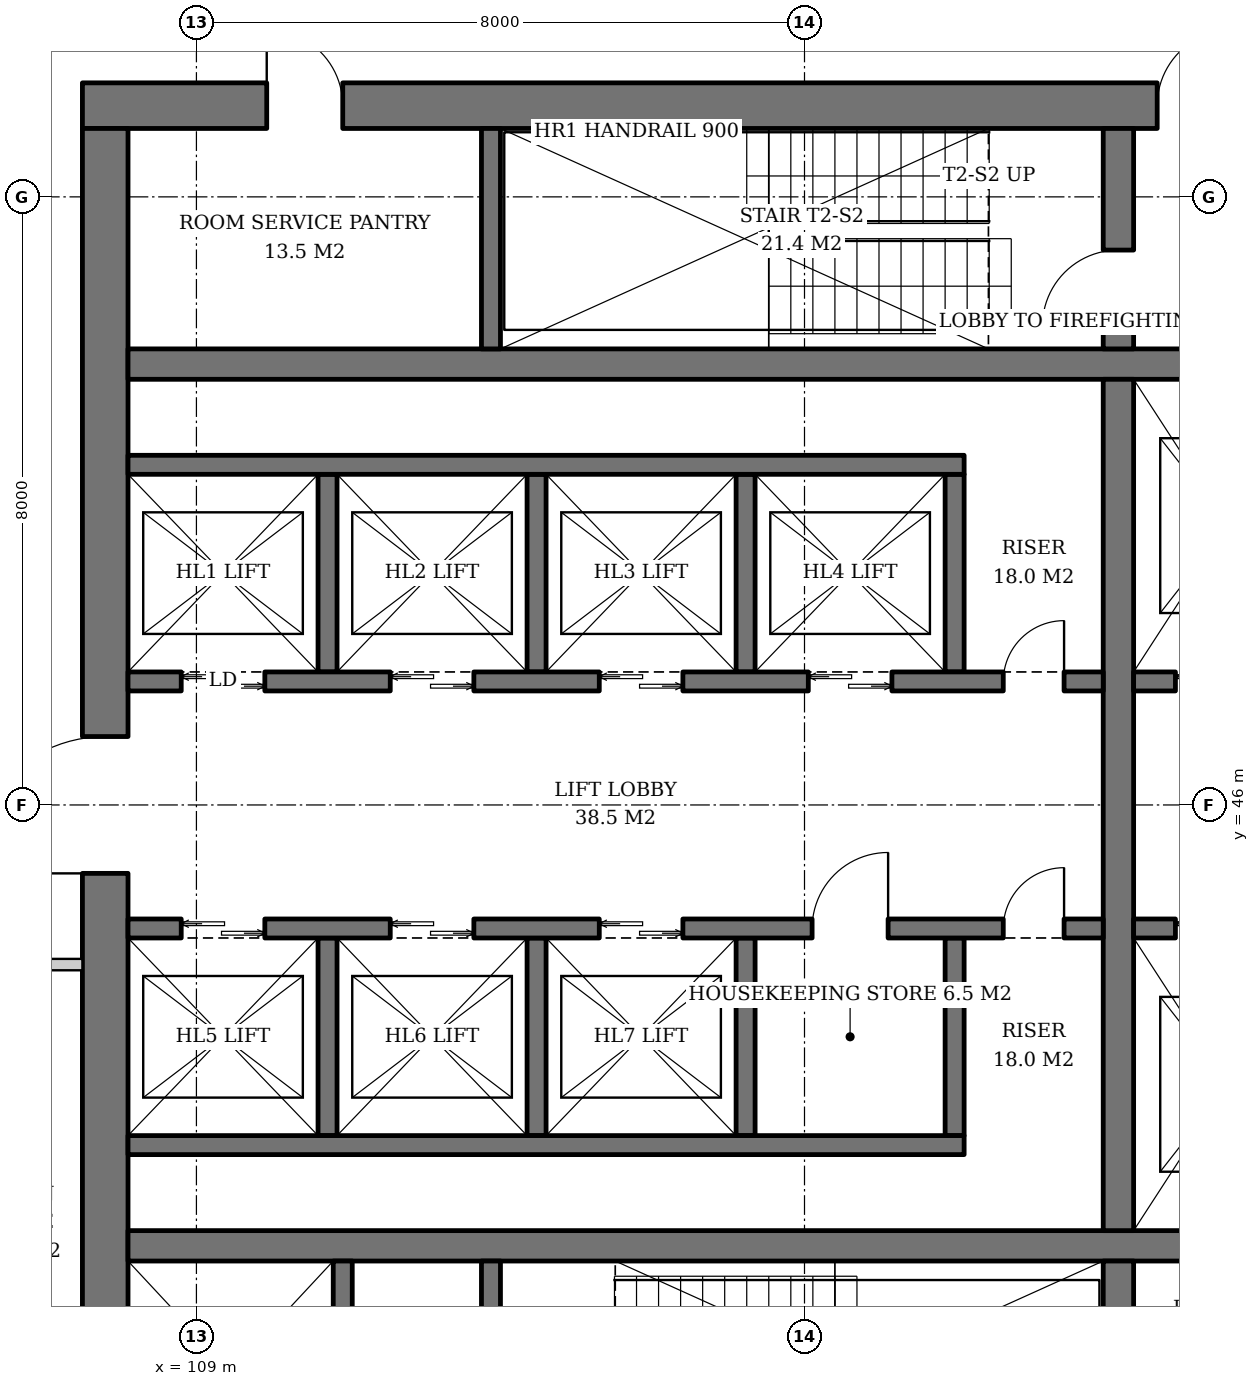
"""IFC4 building model, lengths in metres.
Left out: names, types, materials, properties, quantities, classifications, styles, units other than length and angle.
Written with IfcOpenShell. Run it as: python <this file> out.ifc"""

import sys

from ifc_helpers import new_model, si_unit, direction, frame, frame_2d, origin, place, context, subcontext, project, spatial, rectangle, extrude, element, fill, save


model = new_model("IFC4")
c1 = context("Model", 3, precision=1e-05, world=origin(), true_north=direction((0.0, 1.0)))
c2 = subcontext(c1, "Body", "Model", "MODEL_VIEW")
j1 = project(units=[si_unit("LENGTHUNIT", "METRE"), si_unit("PLANEANGLEUNIT", "RADIAN")], contexts=[c1])
p1 = place(None, origin())
s1 = spatial("IfcSite", under=j1, at=p1, CompositionType="ELEMENT")
p2 = place(p1, origin())
s2 = spatial("IfcBuilding", under=s1, at=p2, CompositionType="ELEMENT")
p3 = place(p2, frame((0.0, 0.0, 28.6)))
s3 = spatial("IfcBuildingStorey", under=s2, at=p3, CompositionType="ELEMENT", Elevation=28.6)
p4 = place(p3, frame((107.5, 55.2, 0.0), z_axis=(0.0, 0.0, 1.0), x_axis=(1.0, 0.0, 0.0)))
e1 = element("IfcWall", 1, at=p4, inside=s3, PredefinedType="SHEAR", context=c2, shape_type="SweptSolid", body=[
    extrude(rectangle(XDim=19.0, YDim=0.6, at=frame_2d((9.5, 0.0))), origin(), (0.0, 0.0, 1.0), 3.8),
])
p5 = place(p4, frame((14.14, 0.0, 0.0)))
e2 = element("IfcOpeningElement", 2, at=p5, cuts=e1, PredefinedType="OPENING", context=c2, shape_type="SweptSolid", body=[
    extrude(rectangle(XDim=1.0, YDim=2.1, at=frame_2d((0.5, 1.05))), frame((0.0, 0.31, 0.0), z_axis=(0.0, -1.0, 0.0), x_axis=(1.0, 0.0, 0.0)), (0.0, 0.0, 1.0), 0.62),
])
p6 = place(p4, frame((2.425, 0.0, 0.0)))
e3 = element("IfcOpeningElement", 3, at=p6, cuts=e1, PredefinedType="OPENING", context=c2, shape_type="SweptSolid", body=[
    extrude(rectangle(XDim=1.0, YDim=2.1, at=frame_2d((0.5, 1.05))), frame((0.0, 0.31, 0.0), z_axis=(0.0, -1.0, 0.0), x_axis=(1.0, 0.0, 0.0)), (0.0, 0.0, 1.0), 0.62),
])
p7 = place(p3, frame((107.8, 37.1, 0.0), z_axis=(0.0, 0.0, 1.0), x_axis=(0.0, 1.0, 0.0)))
e4 = element("IfcWall", 4, at=p7, inside=s3, PredefinedType="SHEAR", context=c2, shape_type="SweptSolid", body=[
    extrude(rectangle(XDim=17.8, YDim=0.6, at=frame_2d((8.9, 0.0))), origin(), (0.0, 0.0, 1.0), 3.8),
])
p8 = place(p7, frame((8.0, 0.0, 0.0)))
e5 = element("IfcOpeningElement", 5, at=p8, cuts=e4, PredefinedType="OPENING", context=c2, shape_type="SweptSolid", body=[
    extrude(rectangle(XDim=1.8, YDim=2.4, at=frame_2d((0.9, 1.2))), frame((0.0, 0.31, 0.0), z_axis=(0.0, -1.0, 0.0), x_axis=(1.0, 0.0, 0.0)), (0.0, 0.0, 1.0), 0.62),
])
for number, where, z_axis, x_axis in (
    (6, (108.1, 40.2, 0.0), (0.0, 0.0, 1.0), (1.0, 0.0, 0.0)),
    (7, (108.1, 51.8, 0.0), (0.0, 0.0, 1.0), (1.0, 0.0, 0.0)),
):
    element("IfcWall", number, at=place(p3, frame(where, z_axis=z_axis, x_axis=x_axis)), inside=s3, PredefinedType="SHEAR", context=c2, shape_type="SweptSolid", body=[
        extrude(rectangle(XDim=17.8, YDim=0.4, at=frame_2d((8.9, 0.0))), origin(), (0.0, 0.0, 1.0), 3.8),
    ])
p9 = place(p3, frame((121.13, 37.1, 0.0), z_axis=(0.0, 0.0, 1.0), x_axis=(0.0, 1.0, 0.0)))
e8 = element("IfcWall", 8, at=p9, inside=s3, PredefinedType="SHEAR", context=c2, shape_type="SweptSolid", body=[
    extrude(rectangle(XDim=2.9, YDim=0.4, at=frame_2d((1.45, 0.0))), origin(), (0.0, 0.0, 1.0), 3.8),
])
p10 = place(p3, frame((121.13, 40.4, 0.0), z_axis=(0.0, 0.0, 1.0), x_axis=(0.0, 1.0, 0.0)))
e9 = element("IfcWall", 9, at=p10, inside=s3, PredefinedType="SHEAR", context=c2, shape_type="SweptSolid", body=[
    extrude(rectangle(XDim=11.2, YDim=0.4, at=frame_2d((5.6, 0.0))), origin(), (0.0, 0.0, 1.0), 3.8),
])
p11 = place(p3, frame((121.13, 52.0, 0.0), z_axis=(0.0, 0.0, 1.0), x_axis=(0.0, 1.0, 0.0)))
e10 = element("IfcWall", 10, at=p11, inside=s3, PredefinedType="SHEAR", context=c2, shape_type="SweptSolid", body=[
    extrude(rectangle(XDim=2.9, YDim=0.4, at=frame_2d((1.45, 0.0))), origin(), (0.0, 0.0, 1.0), 3.8),
])
p12 = place(p11, frame((0.3, 0.0, 0.0)))
e11 = element("IfcOpeningElement", 11, at=p12, cuts=e10, PredefinedType="OPENING", context=c2, shape_type="SweptSolid", body=[
    extrude(rectangle(XDim=1.0, YDim=2.1, at=frame_2d((0.5, 1.05))), frame((0.0, 0.21, 0.0), z_axis=(0.0, -1.0, 0.0), x_axis=(1.0, 0.0, 0.0)), (0.0, 0.0, 1.0), 0.42),
])
p13 = place(p3, frame((110.925, 37.1, 0.0), z_axis=(0.0, 0.0, 1.0), x_axis=(0.0, 1.0, 0.0)))
e12 = element("IfcWall", 12, at=p13, inside=s3, PredefinedType="SHEAR", context=c2, shape_type="SweptSolid", body=[
    extrude(rectangle(XDim=2.9, YDim=0.25, at=frame_2d((1.45, 0.0))), origin(), (0.0, 0.0, 1.0), 3.8),
])
p14 = place(p13, frame((0.8, 0.0, 0.0)))
e13 = element("IfcOpeningElement", 13, at=p14, cuts=e12, PredefinedType="OPENING", context=c2, shape_type="SweptSolid", body=[
    extrude(rectangle(XDim=1.3, YDim=2.2, at=frame_2d((0.65, 1.1))), frame((0.0, 0.135, 0.0), z_axis=(0.0, -1.0, 0.0), x_axis=(1.0, 0.0, 0.0)), (0.0, 0.0, 1.0), 0.27),
])
p15 = place(p3, frame((112.875, 37.1, 0.0), z_axis=(0.0, 0.0, 1.0), x_axis=(0.0, 1.0, 0.0)))
e14 = element("IfcWall", 14, at=p15, inside=s3, PredefinedType="SHEAR", context=c2, shape_type="SweptSolid", body=[
    extrude(rectangle(XDim=2.9, YDim=0.25, at=frame_2d((1.45, 0.0))), origin(), (0.0, 0.0, 1.0), 3.8),
])
p16 = place(p15, frame((0.75, 0.0, 0.0)))
e15 = element("IfcOpeningElement", 15, at=p16, cuts=e14, PredefinedType="OPENING", context=c2, shape_type="SweptSolid", body=[
    extrude(rectangle(XDim=1.2, YDim=2.1, at=frame_2d((0.6, 1.05))), frame((0.0, 0.135, 0.0), z_axis=(0.0, -1.0, 0.0), x_axis=(1.0, 0.0, 0.0)), (0.0, 0.0, 1.0), 0.27),
])
p17 = place(p3, frame((112.875, 52.0, 0.0), z_axis=(0.0, 0.0, 1.0), x_axis=(0.0, 1.0, 0.0)))
e16 = element("IfcWall", 16, at=p17, inside=s3, PredefinedType="SHEAR", context=c2, shape_type="SweptSolid", body=[
    extrude(rectangle(XDim=2.9, YDim=0.25, at=frame_2d((1.45, 0.0))), origin(), (0.0, 0.0, 1.0), 3.8),
])
for number, where, z_axis, x_axis in (
    (17, (110.725, 47.75, 0.0), (0.0, 0.0, 1.0), (0.0, 1.0, 0.0)),
    (18, (113.475, 47.75, 0.0), (0.0, 0.0, 1.0), (0.0, 1.0, 0.0)),
    (19, (116.225, 47.75, 0.0), (0.0, 0.0, 1.0), (0.0, 1.0, 0.0)),
    (20, (118.975, 47.75, 0.0), (0.0, 0.0, 1.0), (0.0, 1.0, 0.0)),
):
    element("IfcWall", number, at=place(p3, frame(where, z_axis=z_axis, x_axis=x_axis)), inside=s3, PredefinedType="SHEAR", context=c2, shape_type="SweptSolid", body=[
        extrude(rectangle(XDim=2.6, YDim=0.25, at=frame_2d((1.3, 0.0))), origin(), (0.0, 0.0, 1.0), 3.8),
    ])
p18 = place(p3, frame((108.1, 50.475, 0.0), z_axis=(0.0, 0.0, 1.0), x_axis=(1.0, 0.0, 0.0)))
e21 = element("IfcWall", 21, at=p18, inside=s3, PredefinedType="SHEAR", context=c2, shape_type="SweptSolid", body=[
    extrude(rectangle(XDim=11.0, YDim=0.25, at=frame_2d((5.5, 0.0))), origin(), (0.0, 0.0, 1.0), 3.8),
])
p19 = place(p3, frame((108.1, 47.625, 0.0), z_axis=(0.0, 0.0, 1.0), x_axis=(1.0, 0.0, 0.0)))
e22 = element("IfcWall", 22, at=p19, inside=s3, PredefinedType="SHEAR", context=c2, shape_type="SweptSolid", body=[
    extrude(rectangle(XDim=12.83, YDim=0.25, at=frame_2d((6.415, 0.0))), origin(), (0.0, 0.0, 1.0), 3.8),
])
p20 = place(p19, frame((0.7, 0.0, 0.0)))
e23 = element("IfcOpeningElement", 23, at=p20, cuts=e22, PredefinedType="OPENING", context=c2, shape_type="SweptSolid", body=[
    extrude(rectangle(XDim=1.1, YDim=2.2, at=frame_2d((0.55, 1.1))), frame((0.0, 0.135, 0.0), z_axis=(0.0, -1.0, 0.0), x_axis=(1.0, 0.0, 0.0)), (0.0, 0.0, 1.0), 0.27),
])
p21 = place(p19, frame((3.45, 0.0, 0.0)))
e24 = element("IfcOpeningElement", 24, at=p21, cuts=e22, PredefinedType="OPENING", context=c2, shape_type="SweptSolid", body=[
    extrude(rectangle(XDim=1.1, YDim=2.2, at=frame_2d((0.55, 1.1))), frame((0.0, 0.135, 0.0), z_axis=(0.0, -1.0, 0.0), x_axis=(1.0, 0.0, 0.0)), (0.0, 0.0, 1.0), 0.27),
])
p22 = place(p19, frame((6.2, 0.0, 0.0)))
e25 = element("IfcOpeningElement", 25, at=p22, cuts=e22, PredefinedType="OPENING", context=c2, shape_type="SweptSolid", body=[
    extrude(rectangle(XDim=1.1, YDim=2.2, at=frame_2d((0.55, 1.1))), frame((0.0, 0.135, 0.0), z_axis=(0.0, -1.0, 0.0), x_axis=(1.0, 0.0, 0.0)), (0.0, 0.0, 1.0), 0.27),
])
p23 = place(p19, frame((8.95, 0.0, 0.0)))
e26 = element("IfcOpeningElement", 26, at=p23, cuts=e22, PredefinedType="OPENING", context=c2, shape_type="SweptSolid", body=[
    extrude(rectangle(XDim=1.1, YDim=2.2, at=frame_2d((0.55, 1.1))), frame((0.0, 0.135, 0.0), z_axis=(0.0, -1.0, 0.0), x_axis=(1.0, 0.0, 0.0)), (0.0, 0.0, 1.0), 0.27),
])
p24 = place(p19, frame((11.515, 0.0, 0.0)))
e27 = element("IfcOpeningElement", 27, at=p24, cuts=e22, PredefinedType="OPENING", context=c2, shape_type="SweptSolid", body=[
    extrude(rectangle(XDim=0.8, YDim=2.0, at=frame_2d((0.4, 1.0))), frame((0.0, 0.135, 0.0), z_axis=(0.0, -1.0, 0.0), x_axis=(1.0, 0.0, 0.0)), (0.0, 0.0, 1.0), 0.27),
])
for number, where, z_axis, x_axis in (
    (28, (110.725, 44.25, 0.0), (0.0, 0.0, 1.0), (0.0, -1.0, 0.0)),
    (29, (113.475, 44.25, 0.0), (0.0, 0.0, 1.0), (0.0, -1.0, 0.0)),
    (30, (116.225, 44.25, 0.0), (0.0, 0.0, 1.0), (0.0, -1.0, 0.0)),
    (31, (118.975, 44.25, 0.0), (0.0, 0.0, 1.0), (0.0, -1.0, 0.0)),
):
    element("IfcWall", number, at=place(p3, frame(where, z_axis=z_axis, x_axis=x_axis)), inside=s3, PredefinedType="SHEAR", context=c2, shape_type="SweptSolid", body=[
        extrude(rectangle(XDim=2.6, YDim=0.25, at=frame_2d((1.3, 0.0))), origin(), (0.0, 0.0, 1.0), 3.8),
    ])
p25 = place(p3, frame((108.1, 41.525, 0.0), z_axis=(0.0, 0.0, 1.0), x_axis=(1.0, 0.0, 0.0)))
e32 = element("IfcWall", 32, at=p25, inside=s3, PredefinedType="SHEAR", context=c2, shape_type="SweptSolid", body=[
    extrude(rectangle(XDim=11.0, YDim=0.25, at=frame_2d((5.5, 0.0))), origin(), (0.0, 0.0, 1.0), 3.8),
])
p26 = place(p3, frame((108.1, 44.375, 0.0), z_axis=(0.0, 0.0, 1.0), x_axis=(1.0, 0.0, 0.0)))
e33 = element("IfcWall", 33, at=p26, inside=s3, PredefinedType="SHEAR", context=c2, shape_type="SweptSolid", body=[
    extrude(rectangle(XDim=12.83, YDim=0.25, at=frame_2d((6.415, 0.0))), origin(), (0.0, 0.0, 1.0), 3.8),
])
p27 = place(p26, frame((0.7, 0.0, 0.0)))
e34 = element("IfcOpeningElement", 34, at=p27, cuts=e33, PredefinedType="OPENING", context=c2, shape_type="SweptSolid", body=[
    extrude(rectangle(XDim=1.1, YDim=2.2, at=frame_2d((0.55, 1.1))), frame((0.0, 0.135, 0.0), z_axis=(0.0, -1.0, 0.0), x_axis=(1.0, 0.0, 0.0)), (0.0, 0.0, 1.0), 0.27),
])
p28 = place(p26, frame((3.45, 0.0, 0.0)))
e35 = element("IfcOpeningElement", 35, at=p28, cuts=e33, PredefinedType="OPENING", context=c2, shape_type="SweptSolid", body=[
    extrude(rectangle(XDim=1.1, YDim=2.2, at=frame_2d((0.55, 1.1))), frame((0.0, 0.135, 0.0), z_axis=(0.0, -1.0, 0.0), x_axis=(1.0, 0.0, 0.0)), (0.0, 0.0, 1.0), 0.27),
])
p29 = place(p26, frame((6.2, 0.0, 0.0)))
e36 = element("IfcOpeningElement", 36, at=p29, cuts=e33, PredefinedType="OPENING", context=c2, shape_type="SweptSolid", body=[
    extrude(rectangle(XDim=1.1, YDim=2.2, at=frame_2d((0.55, 1.1))), frame((0.0, 0.135, 0.0), z_axis=(0.0, -1.0, 0.0), x_axis=(1.0, 0.0, 0.0)), (0.0, 0.0, 1.0), 0.27),
])
p30 = place(p26, frame((9.0, 0.0, 0.0)))
e37 = element("IfcOpeningElement", 37, at=p30, cuts=e33, PredefinedType="OPENING", context=c2, shape_type="SweptSolid", body=[
    extrude(rectangle(XDim=1.0, YDim=2.1, at=frame_2d((0.5, 1.05))), frame((0.0, 0.135, 0.0), z_axis=(0.0, -1.0, 0.0), x_axis=(1.0, 0.0, 0.0)), (0.0, 0.0, 1.0), 0.27),
])
p31 = place(p26, frame((11.515, 0.0, 0.0)))
e38 = element("IfcOpeningElement", 38, at=p31, cuts=e33, PredefinedType="OPENING", context=c2, shape_type="SweptSolid", body=[
    extrude(rectangle(XDim=0.8, YDim=2.0, at=frame_2d((0.4, 1.0))), frame((0.0, 0.135, 0.0), z_axis=(0.0, -1.0, 0.0), x_axis=(1.0, 0.0, 0.0)), (0.0, 0.0, 1.0), 0.27),
])
p32 = place(p3, frame((121.33, 47.625, 0.0), z_axis=(0.0, 0.0, 1.0), x_axis=(1.0, 0.0, 0.0)))
e39 = element("IfcWall", 39, at=p32, inside=s3, PredefinedType="SHEAR", context=c2, shape_type="SweptSolid", body=[
    extrude(rectangle(XDim=4.57, YDim=0.25, at=frame_2d((2.285, 0.0))), origin(), (0.0, 0.0, 1.0), 3.8),
])
p33 = place(p32, frame((0.55, 0.0, 0.0)))
e40 = element("IfcOpeningElement", 40, at=p33, cuts=e39, PredefinedType="OPENING", context=c2, shape_type="SweptSolid", body=[
    extrude(rectangle(XDim=1.4, YDim=2.4, at=frame_2d((0.7, 1.2))), frame((0.0, 0.135, 0.0), z_axis=(0.0, -1.0, 0.0), x_axis=(1.0, 0.0, 0.0)), (0.0, 0.0, 1.0), 0.27),
])
p34 = place(p32, frame((3.26, 0.0, 0.0)))
e41 = element("IfcOpeningElement", 41, at=p34, cuts=e39, PredefinedType="OPENING", context=c2, shape_type="SweptSolid", body=[
    extrude(rectangle(XDim=0.8, YDim=2.0, at=frame_2d((0.4, 1.0))), frame((0.0, 0.135, 0.0), z_axis=(0.0, -1.0, 0.0), x_axis=(1.0, 0.0, 0.0)), (0.0, 0.0, 1.0), 0.27),
])
p35 = place(p3, frame((121.33, 44.375, 0.0), z_axis=(0.0, 0.0, 1.0), x_axis=(1.0, 0.0, 0.0)))
e42 = element("IfcWall", 42, at=p35, inside=s3, PredefinedType="SHEAR", context=c2, shape_type="SweptSolid", body=[
    extrude(rectangle(XDim=4.57, YDim=0.25, at=frame_2d((2.285, 0.0))), origin(), (0.0, 0.0, 1.0), 3.8),
])
p36 = place(p35, frame((0.55, 0.0, 0.0)))
e43 = element("IfcOpeningElement", 43, at=p36, cuts=e42, PredefinedType="OPENING", context=c2, shape_type="SweptSolid", body=[
    extrude(rectangle(XDim=1.4, YDim=2.4, at=frame_2d((0.7, 1.2))), frame((0.0, 0.135, 0.0), z_axis=(0.0, -1.0, 0.0), x_axis=(1.0, 0.0, 0.0)), (0.0, 0.0, 1.0), 0.27),
])
p37 = place(p35, frame((3.26, 0.0, 0.0)))
e44 = element("IfcOpeningElement", 44, at=p37, cuts=e42, PredefinedType="OPENING", context=c2, shape_type="SweptSolid", body=[
    extrude(rectangle(XDim=0.8, YDim=2.0, at=frame_2d((0.4, 1.0))), frame((0.0, 0.135, 0.0), z_axis=(0.0, -1.0, 0.0), x_axis=(1.0, 0.0, 0.0)), (0.0, 0.0, 1.0), 0.27),
])
p38 = place(p3, frame((107.5, 43.9, 0.0), z_axis=(0.0, 0.0, 1.0), x_axis=(-1.0, 0.0, 0.0)))
e45 = element("IfcWall", 45, at=p38, inside=s3, PredefinedType="PARTITIONING", context=c2, shape_type="SweptSolid", body=[
    extrude(rectangle(XDim=1.875, YDim=0.15, at=frame_2d((0.938, 0.0))), origin(), (0.0, 0.0, 1.0), 3.6),
])
p39 = place(p20, origin())
e46 = element("IfcDoor", 46, at=p39, inside=s3, OperationType="DOUBLE_DOOR_SLIDING", PredefinedType="DOOR", context=c2, shape_type="SweptSolid", body=[
    extrude(rectangle(XDim=1.1, YDim=2.2, at=frame_2d((0.55, 1.1))), frame((0.0, 0.025, 0.0), z_axis=(0.0, -1.0, 0.0), x_axis=(1.0, 0.0, 0.0)), (0.0, 0.0, 1.0), 0.05),
])
fill(e23, e46)
p40 = place(p21, origin())
e47 = element("IfcDoor", 47, at=p40, inside=s3, OperationType="DOUBLE_DOOR_SLIDING", PredefinedType="DOOR", context=c2, shape_type="SweptSolid", body=[
    extrude(rectangle(XDim=1.1, YDim=2.2, at=frame_2d((0.55, 1.1))), frame((0.0, 0.025, 0.0), z_axis=(0.0, -1.0, 0.0), x_axis=(1.0, 0.0, 0.0)), (0.0, 0.0, 1.0), 0.05),
])
fill(e24, e47)
p41 = place(p22, origin())
e48 = element("IfcDoor", 48, at=p41, inside=s3, OperationType="DOUBLE_DOOR_SLIDING", PredefinedType="DOOR", context=c2, shape_type="SweptSolid", body=[
    extrude(rectangle(XDim=1.1, YDim=2.2, at=frame_2d((0.55, 1.1))), frame((0.0, 0.025, 0.0), z_axis=(0.0, -1.0, 0.0), x_axis=(1.0, 0.0, 0.0)), (0.0, 0.0, 1.0), 0.05),
])
fill(e25, e48)
p42 = place(p23, origin())
e49 = element("IfcDoor", 49, at=p42, inside=s3, OperationType="DOUBLE_DOOR_SLIDING", PredefinedType="DOOR", context=c2, shape_type="SweptSolid", body=[
    extrude(rectangle(XDim=1.1, YDim=2.2, at=frame_2d((0.55, 1.1))), frame((0.0, 0.025, 0.0), z_axis=(0.0, -1.0, 0.0), x_axis=(1.0, 0.0, 0.0)), (0.0, 0.0, 1.0), 0.05),
])
fill(e26, e49)
p43 = place(p24, origin())
e50 = element("IfcDoor", 50, at=p43, inside=s3, OperationType="SINGLE_SWING_RIGHT", PredefinedType="DOOR", context=c2, shape_type="SweptSolid", body=[
    extrude(rectangle(XDim=0.8, YDim=2.0, at=frame_2d((0.4, 1.0))), frame((0.0, 0.025, 0.0), z_axis=(0.0, -1.0, 0.0), x_axis=(1.0, 0.0, 0.0)), (0.0, 0.0, 1.0), 0.05),
])
fill(e27, e50)
p44 = place(p27, origin())
e51 = element("IfcDoor", 51, at=p44, inside=s3, OperationType="DOUBLE_DOOR_SLIDING", PredefinedType="DOOR", context=c2, shape_type="SweptSolid", body=[
    extrude(rectangle(XDim=1.1, YDim=2.2, at=frame_2d((0.55, 1.1))), frame((0.0, 0.025, 0.0), z_axis=(0.0, -1.0, 0.0), x_axis=(1.0, 0.0, 0.0)), (0.0, 0.0, 1.0), 0.05),
])
fill(e34, e51)
p45 = place(p28, origin())
e52 = element("IfcDoor", 52, at=p45, inside=s3, OperationType="DOUBLE_DOOR_SLIDING", PredefinedType="DOOR", context=c2, shape_type="SweptSolid", body=[
    extrude(rectangle(XDim=1.1, YDim=2.2, at=frame_2d((0.55, 1.1))), frame((0.0, 0.025, 0.0), z_axis=(0.0, -1.0, 0.0), x_axis=(1.0, 0.0, 0.0)), (0.0, 0.0, 1.0), 0.05),
])
fill(e35, e52)
p46 = place(p29, origin())
e53 = element("IfcDoor", 53, at=p46, inside=s3, OperationType="DOUBLE_DOOR_SLIDING", PredefinedType="DOOR", context=c2, shape_type="SweptSolid", body=[
    extrude(rectangle(XDim=1.1, YDim=2.2, at=frame_2d((0.55, 1.1))), frame((0.0, 0.025, 0.0), z_axis=(0.0, -1.0, 0.0), x_axis=(1.0, 0.0, 0.0)), (0.0, 0.0, 1.0), 0.05),
])
fill(e36, e53)
p47 = place(p30, origin())
e54 = element("IfcDoor", 54, at=p47, inside=s3, OperationType="SINGLE_SWING_RIGHT", PredefinedType="DOOR", context=c2, shape_type="SweptSolid", body=[
    extrude(rectangle(XDim=1.0, YDim=2.1, at=frame_2d((0.5, 1.05))), frame((0.0, 0.025, 0.0), z_axis=(0.0, -1.0, 0.0), x_axis=(1.0, 0.0, 0.0)), (0.0, 0.0, 1.0), 0.05),
])
fill(e37, e54)
p48 = place(p31, origin())
e55 = element("IfcDoor", 55, at=p48, inside=s3, OperationType="SINGLE_SWING_RIGHT", PredefinedType="DOOR", context=c2, shape_type="SweptSolid", body=[
    extrude(rectangle(XDim=0.8, YDim=2.0, at=frame_2d((0.4, 1.0))), frame((0.0, 0.025, 0.0), z_axis=(0.0, -1.0, 0.0), x_axis=(1.0, 0.0, 0.0)), (0.0, 0.0, 1.0), 0.05),
])
fill(e38, e55)
p49 = place(p33, origin())
e56 = element("IfcDoor", 56, at=p49, inside=s3, OperationType="DOUBLE_DOOR_SLIDING", PredefinedType="DOOR", context=c2, shape_type="SweptSolid", body=[
    extrude(rectangle(XDim=1.4, YDim=2.4, at=frame_2d((0.7, 1.2))), frame((0.0, 0.025, 0.0), z_axis=(0.0, -1.0, 0.0), x_axis=(1.0, 0.0, 0.0)), (0.0, 0.0, 1.0), 0.05),
])
fill(e40, e56)
p50 = place(p36, origin())
e57 = element("IfcDoor", 57, at=p50, inside=s3, OperationType="DOUBLE_DOOR_SLIDING", PredefinedType="DOOR", context=c2, shape_type="SweptSolid", body=[
    extrude(rectangle(XDim=1.4, YDim=2.4, at=frame_2d((0.7, 1.2))), frame((0.0, 0.025, 0.0), z_axis=(0.0, -1.0, 0.0), x_axis=(1.0, 0.0, 0.0)), (0.0, 0.0, 1.0), 0.05),
])
fill(e43, e57)
p51 = place(p12, origin())
e58 = element("IfcDoor", 58, at=p51, inside=s3, OperationType="SINGLE_SWING_LEFT", PredefinedType="DOOR", context=c2, shape_type="SweptSolid", body=[
    extrude(rectangle(XDim=1.0, YDim=2.1, at=frame_2d((0.5, 1.05))), frame((0.0, 0.025, 0.0), z_axis=(0.0, -1.0, 0.0), x_axis=(1.0, 0.0, 0.0)), (0.0, 0.0, 1.0), 0.05),
])
fill(e11, e58)
p52 = place(p5, origin())
e59 = element("IfcDoor", 59, at=p52, inside=s3, OperationType="SINGLE_SWING_RIGHT", PredefinedType="DOOR", context=c2, shape_type="SweptSolid", body=[
    extrude(rectangle(XDim=1.0, YDim=2.1, at=frame_2d((0.5, 1.05))), frame((0.0, 0.025, 0.0), z_axis=(0.0, -1.0, 0.0), x_axis=(1.0, 0.0, 0.0)), (0.0, 0.0, 1.0), 0.05),
])
fill(e2, e59)
p53 = place(p8, origin())
e60 = element("IfcDoor", 60, at=p53, inside=s3, OperationType="DOUBLE_DOOR_SINGLE_SWING", PredefinedType="DOOR", context=c2, shape_type="SweptSolid", body=[
    extrude(rectangle(XDim=1.8, YDim=2.4, at=frame_2d((0.9, 1.2))), frame((0.0, 0.025, 0.0), z_axis=(0.0, -1.0, 0.0), x_axis=(1.0, 0.0, 0.0)), (0.0, 0.0, 1.0), 0.05),
])
fill(e5, e60)
p54 = place(p6, origin())
e61 = element("IfcDoor", 61, at=p54, inside=s3, OperationType="SINGLE_SWING_LEFT", PredefinedType="DOOR", context=c2, shape_type="SweptSolid", body=[
    extrude(rectangle(XDim=1.0, YDim=2.1, at=frame_2d((0.5, 1.05))), frame((0.0, -0.24, 0.0), z_axis=(0.0, -1.0, 0.0), x_axis=(1.0, 0.0, 0.0)), (0.0, 0.0, 1.0), 0.05),
])
fill(e3, e61)
save(model, sys.argv[1])
